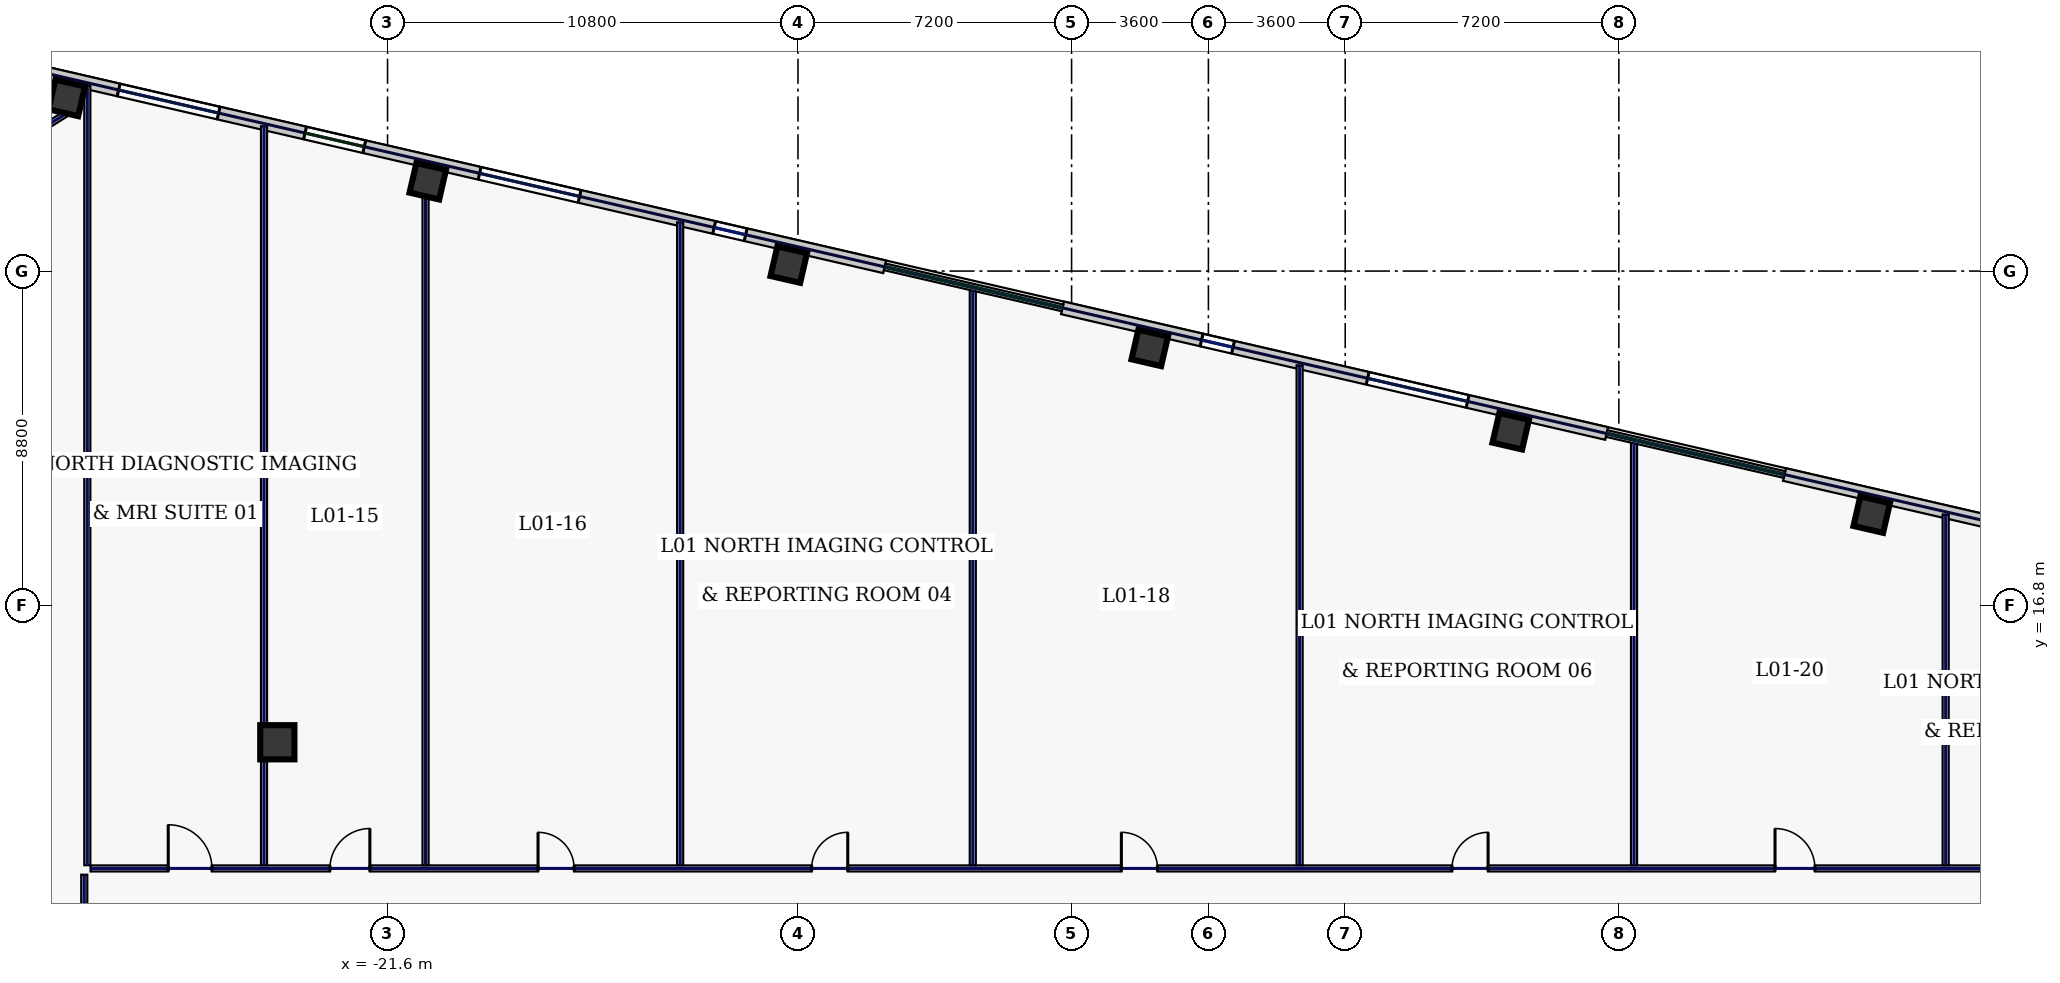
"""IFC4 building model, lengths in metres.
Left out: names, types, materials, properties, quantities, classifications, styles, units other than length and angle.
Written with IfcOpenShell. Run it as: python <this file> out.ifc"""

import sys

from ifc_helpers import new_model, si_unit, direction, frame, frame_2d, origin, origin_2d, place, context, subcontext, project, spatial, rectangle, hollow_rectangle, extrude, element, fill, save


model = new_model("IFC4")
c1 = context("Model", 3, precision=1e-05, world=origin(), true_north=direction((0.0, 1.0)))
c2 = subcontext(c1, "Body", "Model", "MODEL_VIEW")
j1 = project(units=[si_unit("LENGTHUNIT", "METRE"), si_unit("PLANEANGLEUNIT", "RADIAN")], contexts=[c1])
p1 = place(None, origin())
s1 = spatial("IfcSite", under=j1, at=p1, CompositionType="ELEMENT")
p2 = place(p1, origin())
s2 = spatial("IfcBuilding", under=s1, at=p2, CompositionType="ELEMENT")
p3 = place(p2, frame((0.0, 0.0, 8.4)))
s3 = spatial("IfcBuildingStorey", under=s2, at=p3, CompositionType="ELEMENT", Elevation=8.4)
p4 = place(p3, frame((-24.5, 13.2, 0.0), z_axis=(0.0, 0.0, 1.0), x_axis=(1.0, 0.0, 0.0)))
e1 = element("IfcColumn", 1, at=p4, inside=s3, PredefinedType="COLUMN", context=c2, shape_type="SweptSolid", body=[
    extrude(hollow_rectangle(XDim=0.9, YDim=0.9, WallThickness=0.04, at=origin_2d()), origin(), (0.0, 0.0, 1.0), 4.7),
])
for number, where, z_axis, x_axis in (
    (2, (17.454, 19.192, 0.0), (0.0, 0.0, 1.0), (0.974, -0.225, 0.0)),
    (3, (7.955, 21.385, 0.0), (0.0, 0.0, 1.0), (0.974, -0.225, 0.0)),
    (4, (-1.544, 23.578, 0.0), (0.0, 0.0, 1.0), (0.974, -0.225, 0.0)),
    (5, (-11.042, 25.771, 0.0), (0.0, 0.0, 1.0), (0.974, -0.225, 0.0)),
    (6, (-20.541, 27.964, 0.0), (0.0, 0.0, 1.0), (0.974, -0.225, 0.0)),
    (7, (-30.04, 30.156, 0.0), (0.0, 0.0, 1.0), (0.974, -0.225, 0.0)),
):
    element("IfcColumn", number, at=place(p3, frame(where, z_axis=z_axis, x_axis=x_axis)), inside=s3, PredefinedType="COLUMN", context=c2, shape_type="SweptSolid", body=[
        extrude(hollow_rectangle(XDim=0.8, YDim=0.8, WallThickness=0.036, at=origin_2d()), origin(), (0.0, 0.0, 1.0), 4.7),
    ])
p5 = place(p3, frame((37.229, 15.15, 0.0), z_axis=(0.0, 0.0, 1.0), x_axis=(-0.97436993772, 0.224951604723, 0.0)))
e8 = element("IfcWall", 8, at=p5, inside=s3, PredefinedType="STANDARD", context=c2, shape_type="SweptSolid", body=[
    extrude(rectangle(XDim=22.651, YDim=0.34, at=frame_2d((11.326, 0.0))), origin(), (0.0, 0.0, 1.0), 4.7),
])
p6 = place(p5, frame((16.195, 0.0, 0.9)))
e9 = element("IfcOpeningElement", 9, at=p6, cuts=e8, PredefinedType="OPENING", context=c2, shape_type="SweptSolid", body=[
    extrude(rectangle(XDim=0.85, YDim=1.85, at=frame_2d((0.425, 0.925))), frame((0.0, 0.18, 0.0), z_axis=(0.0, -1.0, 0.0), x_axis=(1.0, 0.0, 0.0)), (0.0, 0.0, 1.0), 0.36),
])
p7 = place(p5, frame((13.561, 0.0, 0.9)))
e10 = element("IfcOpeningElement", 10, at=p7, cuts=e8, PredefinedType="OPENING", context=c2, shape_type="SweptSolid", body=[
    extrude(rectangle(XDim=0.85, YDim=1.85, at=frame_2d((0.425, 0.925))), frame((0.0, 0.18, 0.0), z_axis=(0.0, -1.0, 0.0), x_axis=(1.0, 0.0, 0.0)), (0.0, 0.0, 1.0), 0.36),
])
p8 = place(p5, frame((6.447, 0.0, 0.9)))
e11 = element("IfcOpeningElement", 11, at=p8, cuts=e8, PredefinedType="OPENING", context=c2, shape_type="SweptSolid", body=[
    extrude(rectangle(XDim=0.85, YDim=1.85, at=frame_2d((0.425, 0.925))), frame((0.0, 0.18, 0.0), z_axis=(0.0, -1.0, 0.0), x_axis=(1.0, 0.0, 0.0)), (0.0, 0.0, 1.0), 0.36),
])
p9 = place(p5, frame((1.962, 0.0, 0.9)))
e12 = element("IfcOpeningElement", 12, at=p9, cuts=e8, PredefinedType="OPENING", context=c2, shape_type="SweptSolid", body=[
    extrude(rectangle(XDim=2.7, YDim=2.2, at=frame_2d((1.35, 1.1))), frame((0.0, 0.18, 0.0), z_axis=(0.0, -1.0, 0.0), x_axis=(1.0, 0.0, 0.0)), (0.0, 0.0, 1.0), 0.36),
])
p10 = place(p3, frame((10.481, 21.325, 0.0), z_axis=(0.0, 0.0, 1.0), x_axis=(-0.974369353393, 0.2249541357, 0.0)))
e13 = element("IfcWall", 13, at=p10, inside=s3, PredefinedType="STANDARD", context=c2, shape_type="SweptSolid", body=[
    extrude(rectangle(XDim=14.697, YDim=0.34, at=frame_2d((7.349, 0.0))), origin(), (0.0, 0.0, 1.0), 4.7),
])
p11 = place(p10, frame((10.091, 0.0, 0.9)))
e14 = element("IfcOpeningElement", 14, at=p11, cuts=e13, PredefinedType="OPENING", context=c2, shape_type="SweptSolid", body=[
    extrude(rectangle(XDim=0.85, YDim=1.85, at=frame_2d((0.425, 0.925))), frame((0.0, 0.18, 0.0), z_axis=(0.0, -1.0, 0.0), x_axis=(1.0, 0.0, 0.0)), (0.0, 0.0, 1.0), 0.36),
])
p12 = place(p10, frame((3.756, 0.0, 0.9)))
e15 = element("IfcOpeningElement", 15, at=p12, cuts=e13, PredefinedType="OPENING", context=c2, shape_type="SweptSolid", body=[
    extrude(rectangle(XDim=2.7, YDim=2.2, at=frame_2d((1.35, 1.1))), frame((0.0, 0.18, 0.0), z_axis=(0.0, -1.0, 0.0), x_axis=(1.0, 0.0, 0.0)), (0.0, 0.0, 1.0), 0.36),
])
p13 = place(p3, frame((-8.517, 25.711, 0.0), z_axis=(0.0, 0.0, 1.0), x_axis=(-0.974372845456, 0.224939009598, 0.0)))
e16 = element("IfcWall", 16, at=p13, inside=s3, PredefinedType="STANDARD", context=c2, shape_type="SweptSolid", body=[
    extrude(rectangle(XDim=22.652, YDim=0.34, at=frame_2d((11.326, 0.0))), origin(), (0.0, 0.0, 1.0), 4.7),
])
p14 = place(p13, frame((17.989, 0.0, 0.9)))
e17 = element("IfcOpeningElement", 17, at=p14, cuts=e16, PredefinedType="OPENING", context=c2, shape_type="SweptSolid", body=[
    extrude(rectangle(XDim=2.7, YDim=2.2, at=frame_2d((1.35, 1.1))), frame((0.0, 0.18, 0.0), z_axis=(0.0, -1.0, 0.0), x_axis=(1.0, 0.0, 0.0)), (0.0, 0.0, 1.0), 0.36),
])
p15 = place(p13, frame((14.055, 0.0, 0.22)))
e18 = element("IfcOpeningElement", 18, at=p15, cuts=e16, PredefinedType="OPENING", context=c2, shape_type="SweptSolid", body=[
    extrude(rectangle(XDim=1.6, YDim=1.2, at=frame_2d((0.8, 0.6))), frame((0.0, 0.18, 0.0), z_axis=(0.0, -1.0, 0.0), x_axis=(1.0, 0.0, 0.0)), (0.0, 0.0, 1.0), 0.36),
])
p16 = place(p13, frame((8.241, 0.0, 0.9)))
e19 = element("IfcOpeningElement", 19, at=p16, cuts=e16, PredefinedType="OPENING", context=c2, shape_type="SweptSolid", body=[
    extrude(rectangle(XDim=2.7, YDim=2.2, at=frame_2d((1.35, 1.1))), frame((0.0, 0.18, 0.0), z_axis=(0.0, -1.0, 0.0), x_axis=(1.0, 0.0, 0.0)), (0.0, 0.0, 1.0), 0.36),
])
p17 = place(p13, frame((3.756, 0.0, 0.9)))
e20 = element("IfcOpeningElement", 20, at=p17, cuts=e16, PredefinedType="OPENING", context=c2, shape_type="SweptSolid", body=[
    extrude(rectangle(XDim=0.85, YDim=1.85, at=frame_2d((0.425, 0.925))), frame((0.0, 0.18, 0.0), z_axis=(0.0, -1.0, 0.0), x_axis=(1.0, 0.0, 0.0)), (0.0, 0.0, 1.0), 0.36),
])
p18 = place(p3, frame((-29.86, 29.868, 0.0), z_axis=(0.0, 0.0, 1.0), x_axis=(-0.848043064089, -0.529927317139, 0.0)))
e21 = element("IfcWall", 21, at=p18, inside=s3, PredefinedType="PARTITIONING", context=c2, shape_type="SweptSolid", body=[
    extrude(rectangle(XDim=7.354, YDim=0.16, at=frame_2d((3.677, 0.0))), origin(), (0.0, 0.0, 1.0), 4.7),
])
p19 = place(p3, frame((-29.58, -9.715, 0.0), z_axis=(0.0, 0.0, 1.0), x_axis=(0.0, 1.0, 0.0)))
e22 = element("IfcWall", 22, at=p19, inside=s3, PredefinedType="PARTITIONING", context=c2, shape_type="SweptSolid", body=[
    extrude(rectangle(XDim=19.43, YDim=0.16, at=frame_2d((9.715, 0.0))), origin(), (0.0, 0.0, 1.0), 4.7),
])
p20 = place(p19, frame((2.019, 0.0, 0.0)))
e23 = element("IfcOpeningElement", 23, at=p20, cuts=e22, PredefinedType="OPENING", context=c2, shape_type="SweptSolid", body=[
    extrude(rectangle(XDim=0.95, YDim=2.2, at=frame_2d((0.475, 1.1))), frame((0.0, 0.09, 0.0), z_axis=(0.0, -1.0, 0.0), x_axis=(1.0, 0.0, 0.0)), (0.0, 0.0, 1.0), 0.18),
])
p21 = place(p19, frame((6.1, 0.0, 0.0)))
e24 = element("IfcOpeningElement", 24, at=p21, cuts=e22, PredefinedType="OPENING", context=c2, shape_type="SweptSolid", body=[
    extrude(rectangle(XDim=0.95, YDim=2.2, at=frame_2d((0.475, 1.1))), frame((0.0, 0.09, 0.0), z_axis=(0.0, -1.0, 0.0), x_axis=(1.0, 0.0, 0.0)), (0.0, 0.0, 1.0), 0.18),
])
p22 = place(p19, frame((11.3, 0.0, 0.0)))
e25 = element("IfcOpeningElement", 25, at=p22, cuts=e22, PredefinedType="OPENING", context=c2, shape_type="SweptSolid", body=[
    extrude(rectangle(XDim=0.95, YDim=2.2, at=frame_2d((0.475, 1.1))), frame((0.0, 0.09, 0.0), z_axis=(0.0, -1.0, 0.0), x_axis=(1.0, 0.0, 0.0)), (0.0, 0.0, 1.0), 0.18),
])
p23 = place(p19, frame((16.631, 0.0, 0.0)))
e26 = element("IfcOpeningElement", 26, at=p23, cuts=e22, PredefinedType="OPENING", context=c2, shape_type="SweptSolid", body=[
    extrude(rectangle(XDim=0.95, YDim=2.2, at=frame_2d((0.475, 1.1))), frame((0.0, 0.09, 0.0), z_axis=(0.0, -1.0, 0.0), x_axis=(1.0, 0.0, 0.0)), (0.0, 0.0, 1.0), 0.18),
])
p24 = place(p3, frame((-29.415, 9.88, 0.0), z_axis=(0.0, 0.0, 1.0), x_axis=(1.0, 0.0, 0.0)))
e27 = element("IfcWall", 27, at=p24, inside=s3, PredefinedType="PARTITIONING", context=c2, shape_type="SweptSolid", body=[
    extrude(rectangle(XDim=58.83, YDim=0.16, at=frame_2d((29.415, 0.0))), origin(), (0.0, 0.0, 1.0), 4.7),
])
p25 = place(p24, frame((2.044, 0.0, 0.0)))
e28 = element("IfcOpeningElement", 28, at=p25, cuts=e27, PredefinedType="OPENING", context=c2, shape_type="SweptSolid", body=[
    extrude(rectangle(XDim=1.15, YDim=2.2, at=frame_2d((0.575, 1.1))), frame((0.0, 0.09, 0.0), z_axis=(0.0, -1.0, 0.0), x_axis=(1.0, 0.0, 0.0)), (0.0, 0.0, 1.0), 0.18),
])
p26 = place(p24, frame((6.3, 0.0, 0.0)))
e29 = element("IfcOpeningElement", 29, at=p26, cuts=e27, PredefinedType="OPENING", context=c2, shape_type="SweptSolid", body=[
    extrude(rectangle(XDim=1.05, YDim=2.2, at=frame_2d((0.525, 1.1))), frame((0.0, 0.09, 0.0), z_axis=(0.0, -1.0, 0.0), x_axis=(1.0, 0.0, 0.0)), (0.0, 0.0, 1.0), 0.18),
])
p27 = place(p24, frame((11.775, 0.0, 0.0)))
e30 = element("IfcOpeningElement", 30, at=p27, cuts=e27, PredefinedType="OPENING", context=c2, shape_type="SweptSolid", body=[
    extrude(rectangle(XDim=0.95, YDim=2.2, at=frame_2d((0.475, 1.1))), frame((0.0, 0.09, 0.0), z_axis=(0.0, -1.0, 0.0), x_axis=(1.0, 0.0, 0.0)), (0.0, 0.0, 1.0), 0.18),
])
p28 = place(p24, frame((18.975, 0.0, 0.0)))
e31 = element("IfcOpeningElement", 31, at=p28, cuts=e27, PredefinedType="OPENING", context=c2, shape_type="SweptSolid", body=[
    extrude(rectangle(XDim=0.95, YDim=2.2, at=frame_2d((0.475, 1.1))), frame((0.0, 0.09, 0.0), z_axis=(0.0, -1.0, 0.0), x_axis=(1.0, 0.0, 0.0)), (0.0, 0.0, 1.0), 0.18),
])
p29 = place(p24, frame((27.125, 0.0, 0.0)))
e32 = element("IfcOpeningElement", 32, at=p29, cuts=e27, PredefinedType="OPENING", context=c2, shape_type="SweptSolid", body=[
    extrude(rectangle(XDim=0.95, YDim=2.2, at=frame_2d((0.475, 1.1))), frame((0.0, 0.09, 0.0), z_axis=(0.0, -1.0, 0.0), x_axis=(1.0, 0.0, 0.0)), (0.0, 0.0, 1.0), 0.18),
])
p30 = place(p24, frame((35.825, 0.0, 0.0)))
e33 = element("IfcOpeningElement", 33, at=p30, cuts=e27, PredefinedType="OPENING", context=c2, shape_type="SweptSolid", body=[
    extrude(rectangle(XDim=0.95, YDim=2.2, at=frame_2d((0.475, 1.1))), frame((0.0, 0.09, 0.0), z_axis=(0.0, -1.0, 0.0), x_axis=(1.0, 0.0, 0.0)), (0.0, 0.0, 1.0), 0.18),
])
p31 = place(p24, frame((44.325, 0.0, 0.0)))
e34 = element("IfcOpeningElement", 34, at=p31, cuts=e27, PredefinedType="OPENING", context=c2, shape_type="SweptSolid", body=[
    extrude(rectangle(XDim=1.05, YDim=2.2, at=frame_2d((0.525, 1.1))), frame((0.0, 0.09, 0.0), z_axis=(0.0, -1.0, 0.0), x_axis=(1.0, 0.0, 0.0)), (0.0, 0.0, 1.0), 0.18),
])
p32 = place(p24, frame((51.15, 0.0, 0.0)))
e35 = element("IfcOpeningElement", 35, at=p32, cuts=e27, PredefinedType="OPENING", context=c2, shape_type="SweptSolid", body=[
    extrude(rectangle(XDim=1.15, YDim=2.2, at=frame_2d((0.575, 1.1))), frame((0.0, 0.09, 0.0), z_axis=(0.0, -1.0, 0.0), x_axis=(1.0, 0.0, 0.0)), (0.0, 0.0, 1.0), 0.18),
])
p33 = place(p24, frame((56.006, 0.0, 0.0)))
e36 = element("IfcOpeningElement", 36, at=p33, cuts=e27, PredefinedType="OPENING", context=c2, shape_type="SweptSolid", body=[
    extrude(rectangle(XDim=0.95, YDim=2.2, at=frame_2d((0.475, 1.1))), frame((0.0, 0.09, 0.0), z_axis=(0.0, -1.0, 0.0), x_axis=(1.0, 0.0, 0.0)), (0.0, 0.0, 1.0), 0.18),
])
p34 = place(p3, frame((-29.5, 9.965, 0.0), z_axis=(0.0, 0.0, 1.0), x_axis=(0.0, 1.0, 0.0)))
e37 = element("IfcWall", 37, at=p34, inside=s3, PredefinedType="PARTITIONING", context=c2, shape_type="SweptSolid", body=[
    extrude(rectangle(XDim=20.519, YDim=0.16, at=frame_2d((10.259, 0.0))), origin(), (0.0, 0.0, 1.0), 4.7),
])
p35 = place(p3, frame((-24.85, 9.965, 0.0), z_axis=(0.0, 0.0, 1.0), x_axis=(0.0, 1.0, 0.0)))
e38 = element("IfcWall", 38, at=p35, inside=s3, PredefinedType="PARTITIONING", context=c2, shape_type="SweptSolid", body=[
    extrude(rectangle(XDim=19.445, YDim=0.16, at=frame_2d((9.723, 0.0))), origin(), (0.0, 0.0, 1.0), 4.7),
])
p36 = place(p3, frame((-20.6, 9.965, 0.0), z_axis=(0.0, 0.0, 1.0), x_axis=(0.0, 1.0, 0.0)))
e39 = element("IfcWall", 39, at=p36, inside=s3, PredefinedType="PARTITIONING", context=c2, shape_type="SweptSolid", body=[
    extrude(rectangle(XDim=18.464, YDim=0.16, at=frame_2d((9.232, 0.0))), origin(), (0.0, 0.0, 1.0), 4.195),
])
p37 = place(p3, frame((-13.9, 9.965, 0.0), z_axis=(0.0, 0.0, 1.0), x_axis=(0.0, 1.0, 0.0)))
e40 = element("IfcWall", 40, at=p37, inside=s3, PredefinedType="PARTITIONING", context=c2, shape_type="SweptSolid", body=[
    extrude(rectangle(XDim=16.917, YDim=0.16, at=frame_2d((8.458, 0.0))), origin(), (0.0, 0.0, 1.0), 4.7),
])
p38 = place(p3, frame((-6.2, 9.965, 0.0), z_axis=(0.0, 0.0, 1.0), x_axis=(0.0, 1.0, 0.0)))
e41 = element("IfcWall", 41, at=p38, inside=s3, PredefinedType="PARTITIONING", context=c2, shape_type="SweptSolid", body=[
    extrude(rectangle(XDim=15.139, YDim=0.16, at=frame_2d((7.57, 0.0))), origin(), (0.0, 0.0, 1.0), 4.7),
])
p39 = place(p3, frame((2.4, 9.965, 0.0), z_axis=(0.0, 0.0, 1.0), x_axis=(0.0, 1.0, 0.0)))
e42 = element("IfcWall", 42, at=p39, inside=s3, PredefinedType="PARTITIONING", context=c2, shape_type="SweptSolid", body=[
    extrude(rectangle(XDim=13.154, YDim=0.16, at=frame_2d((6.577, 0.0))), origin(), (0.0, 0.0, 1.0), 4.7),
])
p40 = place(p3, frame((11.2, 9.965, 0.0), z_axis=(0.0, 0.0, 1.0), x_axis=(0.0, 1.0, 0.0)))
e43 = element("IfcWall", 43, at=p40, inside=s3, PredefinedType="PARTITIONING", context=c2, shape_type="SweptSolid", body=[
    extrude(rectangle(XDim=11.122, YDim=0.16, at=frame_2d((5.561, 0.0))), origin(), (0.0, 0.0, 1.0), 4.7),
])
p41 = place(p3, frame((19.4, 9.965, 0.0), z_axis=(0.0, 0.0, 1.0), x_axis=(0.0, 1.0, 0.0)))
e44 = element("IfcWall", 44, at=p41, inside=s3, PredefinedType="PARTITIONING", context=c2, shape_type="SweptSolid", body=[
    extrude(rectangle(XDim=9.229, YDim=0.16, at=frame_2d((4.615, 0.0))), origin(), (0.0, 0.0, 1.0), 4.7),
])
p42 = place(p11, origin())
e45 = element("IfcWindow", 45, at=p42, inside=s3, PartitioningType="SINGLE_PANEL", PredefinedType="WINDOW", context=c2, shape_type="SweptSolid", body=[
    extrude(rectangle(XDim=0.85, YDim=1.85, at=frame_2d((0.425, 0.925))), frame((0.0, 0.03, 0.0), z_axis=(0.0, -1.0, 0.0), x_axis=(1.0, 0.0, 0.0)), (0.0, 0.0, 1.0), 0.06),
])
fill(e14, e45)
p43 = place(p12, origin())
e46 = element("IfcWindow", 46, at=p43, inside=s3, PartitioningType="SINGLE_PANEL", PredefinedType="WINDOW", context=c2, shape_type="SweptSolid", body=[
    extrude(rectangle(XDim=2.7, YDim=2.2, at=frame_2d((1.35, 1.1))), frame((0.0, 0.03, 0.0), z_axis=(0.0, -1.0, 0.0), x_axis=(1.0, 0.0, 0.0)), (0.0, 0.0, 1.0), 0.06),
])
fill(e15, e46)
p44 = place(p14, origin())
e47 = element("IfcWindow", 47, at=p44, inside=s3, PartitioningType="SINGLE_PANEL", PredefinedType="WINDOW", context=c2, shape_type="SweptSolid", body=[
    extrude(rectangle(XDim=2.7, YDim=2.2, at=frame_2d((1.35, 1.1))), frame((0.0, 0.03, 0.0), z_axis=(0.0, -1.0, 0.0), x_axis=(1.0, 0.0, 0.0)), (0.0, 0.0, 1.0), 0.06),
])
fill(e17, e47)
p45 = place(p15, origin())
e48 = element("IfcWindow", 48, at=p45, inside=s3, PartitioningType="SINGLE_PANEL", PredefinedType="WINDOW", context=c2, shape_type="SweptSolid", body=[
    extrude(rectangle(XDim=1.6, YDim=1.2, at=frame_2d((0.8, 0.6))), frame((0.0, 0.03, 0.0), z_axis=(0.0, -1.0, 0.0), x_axis=(1.0, 0.0, 0.0)), (0.0, 0.0, 1.0), 0.06),
])
fill(e18, e48)
p46 = place(p16, origin())
e49 = element("IfcWindow", 49, at=p46, inside=s3, PartitioningType="SINGLE_PANEL", PredefinedType="WINDOW", context=c2, shape_type="SweptSolid", body=[
    extrude(rectangle(XDim=2.7, YDim=2.2, at=frame_2d((1.35, 1.1))), frame((0.0, 0.03, 0.0), z_axis=(0.0, -1.0, 0.0), x_axis=(1.0, 0.0, 0.0)), (0.0, 0.0, 1.0), 0.06),
])
fill(e19, e49)
p47 = place(p17, origin())
e50 = element("IfcWindow", 50, at=p47, inside=s3, PartitioningType="SINGLE_PANEL", PredefinedType="WINDOW", context=c2, shape_type="SweptSolid", body=[
    extrude(rectangle(XDim=0.85, YDim=1.85, at=frame_2d((0.425, 0.925))), frame((0.0, 0.03, 0.0), z_axis=(0.0, -1.0, 0.0), x_axis=(1.0, 0.0, 0.0)), (0.0, 0.0, 1.0), 0.06),
])
fill(e20, e50)
p48 = place(p25, origin())
e51 = element("IfcDoor", 51, at=p48, inside=s3, OperationType="SINGLE_SWING_LEFT", PredefinedType="DOOR", context=c2, shape_type="SweptSolid", body=[
    extrude(rectangle(XDim=1.15, YDim=2.2, at=frame_2d((0.575, 1.1))), frame((0.0, 0.025, 0.0), z_axis=(0.0, -1.0, 0.0), x_axis=(1.0, 0.0, 0.0)), (0.0, 0.0, 1.0), 0.05),
])
fill(e28, e51)
p49 = place(p26, origin())
e52 = element("IfcDoor", 52, at=p49, inside=s3, OperationType="SINGLE_SWING_RIGHT", PredefinedType="DOOR", context=c2, shape_type="SweptSolid", body=[
    extrude(rectangle(XDim=1.05, YDim=2.2, at=frame_2d((0.525, 1.1))), frame((0.0, 0.025, 0.0), z_axis=(0.0, -1.0, 0.0), x_axis=(1.0, 0.0, 0.0)), (0.0, 0.0, 1.0), 0.05),
])
fill(e29, e52)
p50 = place(p27, origin())
e53 = element("IfcDoor", 53, at=p50, inside=s3, OperationType="SINGLE_SWING_LEFT", PredefinedType="DOOR", context=c2, shape_type="SweptSolid", body=[
    extrude(rectangle(XDim=0.95, YDim=2.2, at=frame_2d((0.475, 1.1))), frame((0.0, 0.025, 0.0), z_axis=(0.0, -1.0, 0.0), x_axis=(1.0, 0.0, 0.0)), (0.0, 0.0, 1.0), 0.05),
])
fill(e30, e53)
p51 = place(p28, origin())
e54 = element("IfcDoor", 54, at=p51, inside=s3, OperationType="SINGLE_SWING_RIGHT", PredefinedType="DOOR", context=c2, shape_type="SweptSolid", body=[
    extrude(rectangle(XDim=0.95, YDim=2.2, at=frame_2d((0.475, 1.1))), frame((0.0, 0.025, 0.0), z_axis=(0.0, -1.0, 0.0), x_axis=(1.0, 0.0, 0.0)), (0.0, 0.0, 1.0), 0.05),
])
fill(e31, e54)
p52 = place(p29, origin())
e55 = element("IfcDoor", 55, at=p52, inside=s3, OperationType="SINGLE_SWING_LEFT", PredefinedType="DOOR", context=c2, shape_type="SweptSolid", body=[
    extrude(rectangle(XDim=0.95, YDim=2.2, at=frame_2d((0.475, 1.1))), frame((0.0, 0.025, 0.0), z_axis=(0.0, -1.0, 0.0), x_axis=(1.0, 0.0, 0.0)), (0.0, 0.0, 1.0), 0.05),
])
fill(e32, e55)
p53 = place(p30, origin())
e56 = element("IfcDoor", 56, at=p53, inside=s3, OperationType="SINGLE_SWING_RIGHT", PredefinedType="DOOR", context=c2, shape_type="SweptSolid", body=[
    extrude(rectangle(XDim=0.95, YDim=2.2, at=frame_2d((0.475, 1.1))), frame((0.0, 0.025, 0.0), z_axis=(0.0, -1.0, 0.0), x_axis=(1.0, 0.0, 0.0)), (0.0, 0.0, 1.0), 0.05),
])
fill(e33, e56)
p54 = place(p31, origin())
e57 = element("IfcDoor", 57, at=p54, inside=s3, OperationType="SINGLE_SWING_LEFT", PredefinedType="DOOR", context=c2, shape_type="SweptSolid", body=[
    extrude(rectangle(XDim=1.05, YDim=2.2, at=frame_2d((0.525, 1.1))), frame((0.0, 0.025, 0.0), z_axis=(0.0, -1.0, 0.0), x_axis=(1.0, 0.0, 0.0)), (0.0, 0.0, 1.0), 0.05),
])
fill(e34, e57)
save(model, sys.argv[1])
